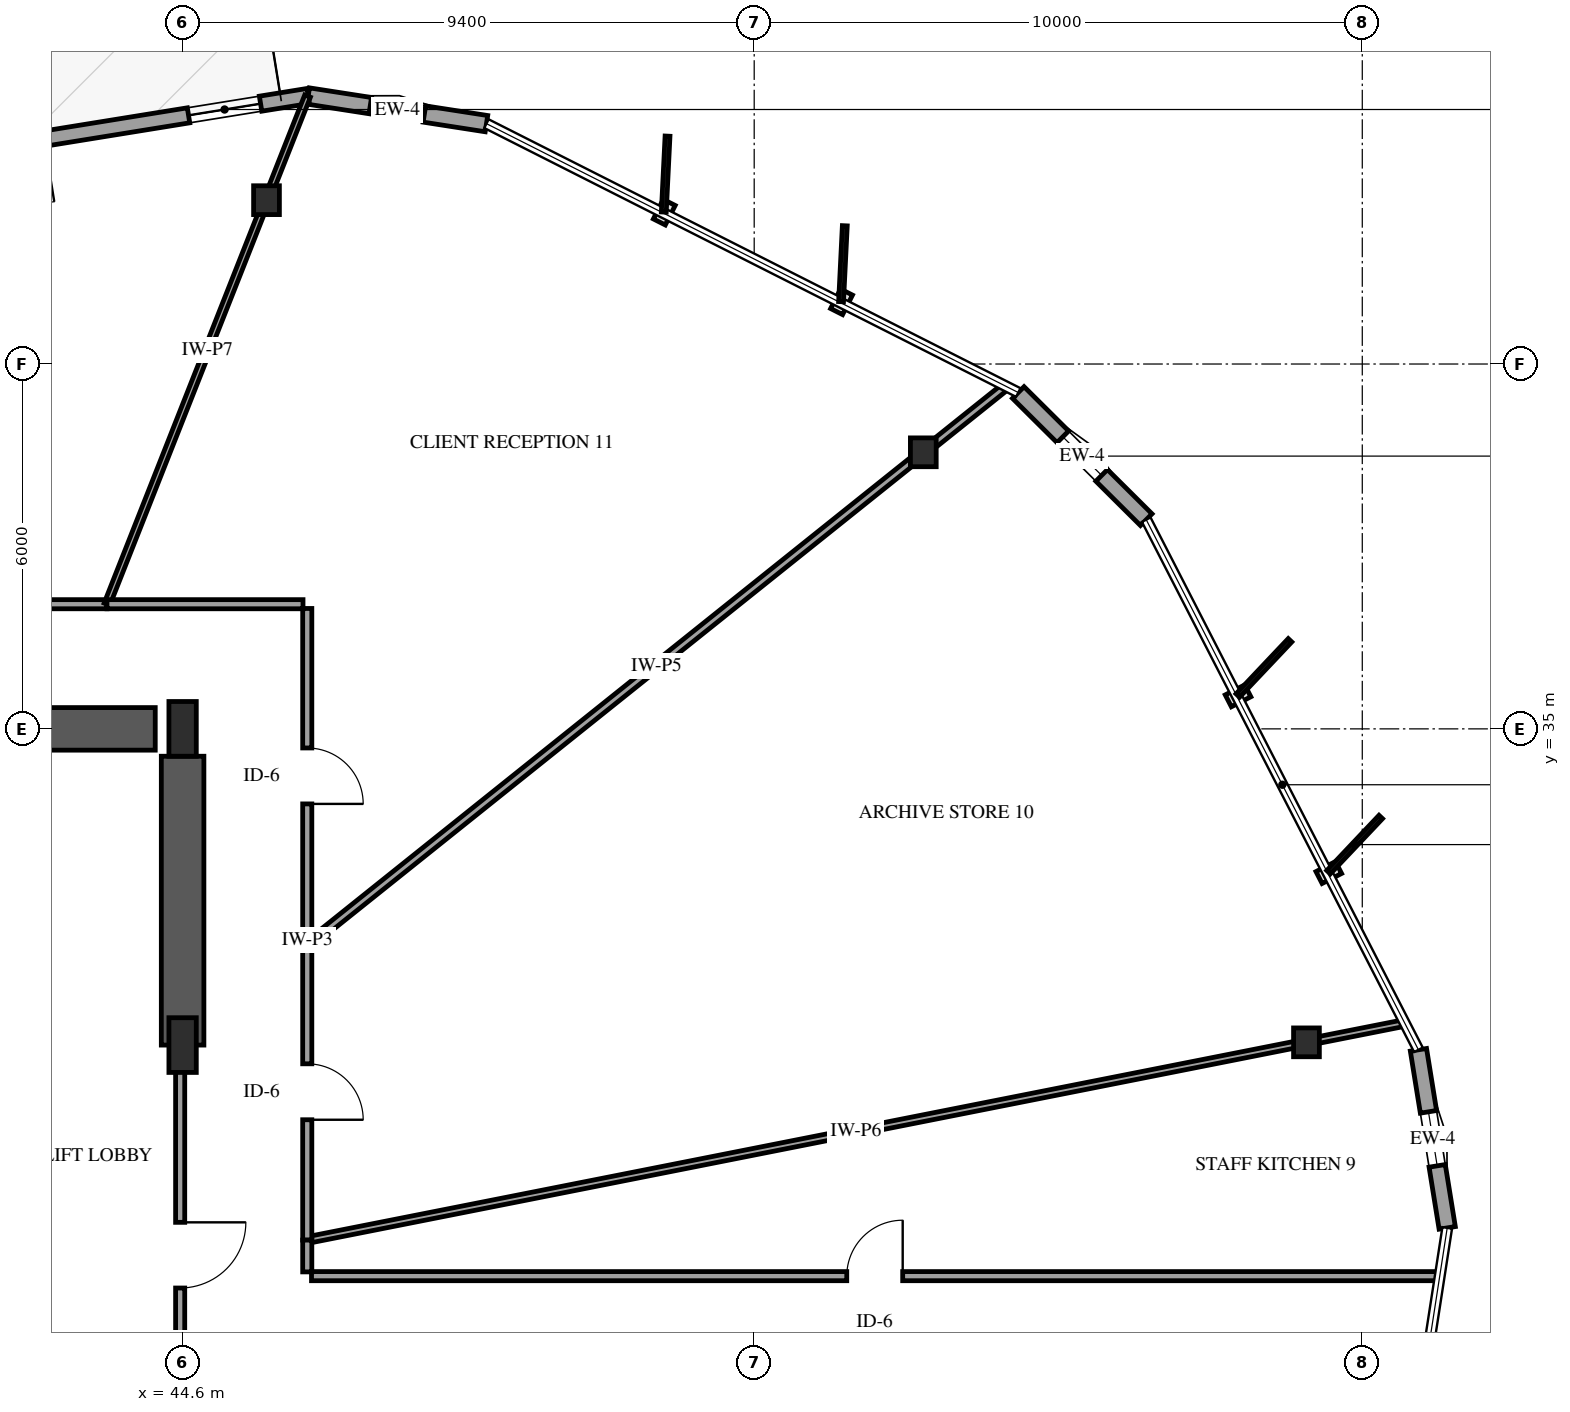
"""IFC4 building model, lengths in metres.
Left out: names, types, materials, properties, quantities, classifications, styles, units other than length and angle.
Written with IfcOpenShell. Run it as: python <this file> out.ifc"""

import sys

from ifc_helpers import new_model, si_unit, direction, frame, frame_2d, origin, origin_2d, place, context, subcontext, project, spatial, rectangle, i_section, extrude, element, fill, save


model = new_model("IFC4")
c1 = context("Model", 3, precision=1e-05, world=origin(), true_north=direction((0.0, 1.0)))
c2 = subcontext(c1, "Body", "Model", "MODEL_VIEW")
j1 = project(units=[si_unit("LENGTHUNIT", "METRE"), si_unit("PLANEANGLEUNIT", "RADIAN")], contexts=[c1])
p1 = place(None, origin())
s1 = spatial("IfcSite", under=j1, at=p1, CompositionType="ELEMENT")
p2 = place(p1, origin())
s2 = spatial("IfcBuilding", under=s1, at=p2, CompositionType="ELEMENT")
p3 = place(p2, frame((0.0, 0.0, 62.6)))
s3 = spatial("IfcBuildingStorey", under=s2, at=p3, CompositionType="ELEMENT", Elevation=62.6)
p4 = place(p3, frame((41.3, 35.0, 0.0), z_axis=(0.0, 0.0, 1.0), x_axis=(1.0, 0.0, 0.0)))
e1 = element("IfcWall", 1, at=p4, inside=s3, PredefinedType="SHEAR", context=c2, shape_type="SweptSolid", body=[
    extrude(rectangle(XDim=2.85, YDim=0.7, at=frame_2d((1.425, 0.0))), origin(), (0.0, 0.0, 1.0), 4.0),
])
p5 = place(p3, frame((44.6, 29.8, 0.0), z_axis=(0.0, 0.0, 1.0), x_axis=(0.0, 1.0, 0.0)))
e2 = element("IfcWall", 2, at=p5, inside=s3, PredefinedType="SHEAR", context=c2, shape_type="SweptSolid", body=[
    extrude(rectangle(XDim=4.75, YDim=0.7, at=frame_2d((2.375, 0.0))), origin(), (0.0, 0.0, 1.0), 4.0),
])
for number, where, z_axis, x_axis in (
    (3, (44.6, 29.8, 0.0), (0.0, 0.0, 1.0), (1.0, 0.0, 0.0)),
    (4, (44.6, 35.0, 0.0), (0.0, 0.0, 1.0), (1.0, 0.0, 0.0)),
):
    element("IfcColumn", number, at=place(p3, frame(where, z_axis=z_axis, x_axis=x_axis)), inside=s3, PredefinedType="PILASTER", context=c2, shape_type="SweptSolid", body=[
        extrude(rectangle(XDim=0.45, YDim=0.9, at=origin_2d()), origin(), (0.0, 0.0, 1.0), 4.0),
    ])
for number, where, z_axis, x_axis in (
    (5, (63.082, 29.845, 0.0), (0.0, 0.0, 1.0), (1.0, 0.0, 0.0)),
    (6, (56.781, 39.548, 0.0), (0.0, 0.0, 1.0), (1.0, 0.0, 0.0)),
    (7, (45.98, 43.694, 0.0), (0.0, 0.0, 1.0), (1.0, 0.0, 0.0)),
):
    element("IfcColumn", number, at=place(p3, frame(where, z_axis=z_axis, x_axis=x_axis)), inside=s3, PredefinedType="COLUMN", context=c2, shape_type="SweptSolid", body=[
        extrude(i_section(OverallWidth=0.424, OverallDepth=0.474, WebThickness=0.048, FlangeThickness=0.077, FilletRadius=0.038, at=origin_2d()), origin(), (0.0, 0.0, 1.0), 4.0),
    ])
p6 = place(p3, frame((60.447, 38.44, 0.0), z_axis=(0.0, 0.0, 1.0), x_axis=(-0.709325332319, 0.704881247396, 0.0)))
e8 = element("IfcWall", 8, at=p6, inside=s3, PredefinedType="SOLIDWALL", context=c2, shape_type="SweptSolid", body=[
    extrude(rectangle(XDim=2.967, YDim=0.27, at=frame_2d((1.483, 0.0))), origin(), (0.0, 0.0, 1.0), 3.079),
])
p7 = place(p6, frame((1.033, 0.0, 0.75)))
e9 = element("IfcOpeningElement", 9, at=p7, cuts=e8, PredefinedType="OPENING", context=c2, shape_type="SweptSolid", body=[
    extrude(rectangle(XDim=0.9, YDim=1.5, at=frame_2d((0.45, 0.75))), frame((0.0, 0.145, 0.0), z_axis=(0.0, -1.0, 0.0), x_axis=(1.0, 0.0, 0.0)), (0.0, 0.0, 1.0), 0.29),
])
p8 = place(p3, frame((49.597, 44.953, 0.0), z_axis=(0.0, 0.0, 1.0), x_axis=(-0.988175838345, 0.153324859402, 0.0)))
e10 = element("IfcWall", 10, at=p8, inside=s3, PredefinedType="SOLIDWALL", context=c2, shape_type="SweptSolid", body=[
    extrude(rectangle(XDim=2.967, YDim=0.27, at=frame_2d((1.483, 0.0))), origin(), (0.0, 0.0, 1.0), 3.079),
])
p9 = place(p8, frame((1.033, 0.0, 0.75)))
e11 = element("IfcOpeningElement", 11, at=p9, cuts=e10, PredefinedType="OPENING", context=c2, shape_type="SweptSolid", body=[
    extrude(rectangle(XDim=0.9, YDim=1.5, at=frame_2d((0.45, 0.75))), frame((0.0, 0.145, 0.0), z_axis=(0.0, -1.0, 0.0), x_axis=(1.0, 0.0, 0.0)), (0.0, 0.0, 1.0), 0.29),
])
p10 = place(p3, frame((46.666, 45.408, 0.0), z_axis=(0.0, 0.0, 1.0), x_axis=(-0.987191297579, -0.159541035424, 0.0)))
e12 = element("IfcWall", 12, at=p10, inside=s3, PredefinedType="SOLIDWALL", context=c2, shape_type="SweptSolid", body=[
    extrude(rectangle(XDim=9.8, YDim=0.25, at=frame_2d((4.9, 0.0))), origin(), (0.0, 0.0, 1.0), 3.079),
])
p11 = place(p10, frame((4.4, 0.0, 0.0)))
e13 = element("IfcOpeningElement", 13, at=p11, cuts=e12, PredefinedType="OPENING", context=c2, shape_type="SweptSolid", body=[
    extrude(rectangle(XDim=1.05, YDim=2.15, at=frame_2d((0.525, 1.075))), frame((0.0, 0.135, 0.0), z_axis=(0.0, -1.0, 0.0), x_axis=(1.0, 0.0, 0.0)), (0.0, 0.0, 1.0), 0.27),
])
p12 = place(p10, frame((0.793, 0.0, 0.72)))
e14 = element("IfcOpeningElement", 14, at=p12, cuts=e12, PredefinedType="OPENING", context=c2, shape_type="SweptSolid", body=[
    extrude(rectangle(XDim=1.2, YDim=1.6, at=frame_2d((0.6, 0.8))), frame((0.0, 0.135, 0.0), z_axis=(0.0, -1.0, 0.0), x_axis=(1.0, 0.0, 0.0)), (0.0, 0.0, 1.0), 0.27),
])
p13 = place(p10, frame((6.09, 0.0, 0.72)))
e15 = element("IfcOpeningElement", 15, at=p13, cuts=e12, PredefinedType="OPENING", context=c2, shape_type="SweptSolid", body=[
    extrude(rectangle(XDim=1.2, YDim=1.6, at=frame_2d((0.6, 0.8))), frame((0.0, 0.135, 0.0), z_axis=(0.0, -1.0, 0.0), x_axis=(1.0, 0.0, 0.0)), (0.0, 0.0, 1.0), 0.27),
])
p14 = place(p3, frame((65.397, 26.794, 0.0), z_axis=(0.0, 0.0, 1.0), x_axis=(-0.159485992922, 0.987200191482, 0.0)))
e16 = element("IfcWall", 16, at=p14, inside=s3, PredefinedType="SOLIDWALL", context=c2, shape_type="SweptSolid", body=[
    extrude(rectangle(XDim=2.967, YDim=0.27, at=frame_2d((1.483, 0.0))), origin(), (0.0, 0.0, 1.0), 3.079),
])
p15 = place(p14, frame((1.033, 0.0, 0.75)))
e17 = element("IfcOpeningElement", 17, at=p15, cuts=e16, PredefinedType="OPENING", context=c2, shape_type="SweptSolid", body=[
    extrude(rectangle(XDim=0.9, YDim=1.5, at=frame_2d((0.45, 0.75))), frame((0.0, 0.145, 0.0), z_axis=(0.0, -1.0, 0.0), x_axis=(1.0, 0.0, 0.0)), (0.0, 0.0, 1.0), 0.29),
])
p16 = place(p3, frame((46.72, 26.0, 0.0), z_axis=(0.0, 0.0, 1.0), x_axis=(1.0, 0.0, 0.0)))
e18 = element("IfcWall", 18, at=p16, inside=s3, PredefinedType="PARTITIONING", context=c2, shape_type="SweptSolid", body=[
    extrude(rectangle(XDim=18.554, YDim=0.15, at=frame_2d((9.277, 0.0))), origin(), (0.0, 0.0, 1.0), 3.7),
])
p17 = place(p16, frame((8.802, 0.0, 0.0)))
e19 = element("IfcOpeningElement", 19, at=p17, cuts=e18, PredefinedType="OPENING", context=c2, shape_type="SweptSolid", body=[
    extrude(rectangle(XDim=0.92, YDim=2.12, at=frame_2d((0.46, 1.06))), frame((0.0, 0.085, 0.0), z_axis=(0.0, -1.0, 0.0), x_axis=(1.0, 0.0, 0.0)), (0.0, 0.0, 1.0), 0.17),
])
p18 = place(p3, frame((46.65, 26.593, 0.0), z_axis=(0.0, 0.0, 1.0), x_axis=(0.980979806003, 0.194109814835, 0.0)))
e20 = element("IfcWall", 20, at=p18, inside=s3, PredefinedType="PARTITIONING", context=c2, shape_type="SweptSolid", body=[
    extrude(rectangle(XDim=18.397, YDim=0.11, at=frame_2d((9.198, 0.0))), origin(), (0.0, 0.0, 1.0), 2.995),
])
p19 = place(p3, frame((46.65, 31.442, 0.0), z_axis=(0.0, 0.0, 1.0), x_axis=(0.780838051211, 0.624733493405, 0.0)))
e21 = element("IfcWall", 21, at=p19, inside=s3, PredefinedType="PARTITIONING", context=c2, shape_type="SweptSolid", body=[
    extrude(rectangle(XDim=14.714, YDim=0.13, at=frame_2d((7.357, 0.0))), origin(), (0.0, 0.0, 1.0), 3.7),
])
p20 = place(p3, frame((32.67, 37.05, 0.0), z_axis=(0.0, 0.0, 1.0), x_axis=(1.0, 0.0, 0.0)))
e22 = element("IfcWall", 22, at=p20, inside=s3, PredefinedType="PARTITIONING", context=c2, shape_type="SweptSolid", body=[
    extrude(rectangle(XDim=10.686, YDim=0.15, at=frame_2d((5.343, 0.0))), origin(), (0.0, 0.0, 1.0), 3.7),
])
p21 = place(p20, frame((4.868, 0.0, 0.0)))
e23 = element("IfcOpeningElement", 23, at=p21, cuts=e22, PredefinedType="OPENING", context=c2, shape_type="SweptSolid", body=[
    extrude(rectangle(XDim=0.92, YDim=2.12, at=frame_2d((0.46, 1.06))), frame((0.0, 0.085, 0.0), z_axis=(0.0, -1.0, 0.0), x_axis=(1.0, 0.0, 0.0)), (0.0, 0.0, 1.0), 0.17),
])
p22 = place(p3, frame((43.356, 37.05, 0.0), z_axis=(0.0, 0.0, 1.0), x_axis=(0.367230883779, 0.930129817821, 0.0)))
e24 = element("IfcWall", 24, at=p22, inside=s3, PredefinedType="PARTITIONING", context=c2, shape_type="SweptSolid", body=[
    extrude(rectangle(XDim=8.984, YDim=0.1, at=frame_2d((4.492, 0.0))), origin(), (0.0, 0.0, 1.0), 2.995),
])
p23 = place(p3, frame((44.56, 29.8, 0.0), z_axis=(0.0, 0.0, 1.0), x_axis=(0.0, -1.0, 0.0)))
e25 = element("IfcWall", 25, at=p23, inside=s3, PredefinedType="PARTITIONING", context=c2, shape_type="SweptSolid", body=[
    extrude(rectangle(XDim=6.91, YDim=0.15, at=frame_2d((3.455, 0.0))), origin(), (0.0, 0.0, 1.0), 2.74),
])
p24 = place(p23, frame((2.915, 0.0, 0.0)))
e26 = element("IfcOpeningElement", 26, at=p24, cuts=e25, PredefinedType="OPENING", context=c2, shape_type="SweptSolid", body=[
    extrude(rectangle(XDim=1.08, YDim=2.15, at=frame_2d((0.54, 1.075))), frame((0.0, 0.085, 0.0), z_axis=(0.0, -1.0, 0.0), x_axis=(1.0, 0.0, 0.0)), (0.0, 0.0, 1.0), 0.17),
])
p25 = place(p3, frame((46.65, 36.98, 0.0), z_axis=(0.0, 0.0, 1.0), x_axis=(0.0, -1.0, 0.0)))
e27 = element("IfcWall", 27, at=p25, inside=s3, PredefinedType="PARTITIONING", context=c2, shape_type="SweptSolid", body=[
    extrude(rectangle(XDim=5.538, YDim=0.15, at=frame_2d((2.769, 0.0))), origin(), (0.0, 0.0, 1.0), 3.7),
])
p26 = place(p25, frame((2.294, 0.0, 0.0)))
e28 = element("IfcOpeningElement", 28, at=p26, cuts=e27, PredefinedType="OPENING", context=c2, shape_type="SweptSolid", body=[
    extrude(rectangle(XDim=0.92, YDim=2.12, at=frame_2d((0.46, 1.06))), frame((0.0, 0.085, 0.0), z_axis=(0.0, -1.0, 0.0), x_axis=(1.0, 0.0, 0.0)), (0.0, 0.0, 1.0), 0.17),
])
p27 = place(p3, frame((46.65, 31.442, 0.0), z_axis=(0.0, 0.0, 1.0), x_axis=(0.0, -1.0, 0.0)))
e29 = element("IfcWall", 29, at=p27, inside=s3, PredefinedType="PARTITIONING", context=c2, shape_type="SweptSolid", body=[
    extrude(rectangle(XDim=4.849, YDim=0.15, at=frame_2d((2.424, 0.0))), origin(), (0.0, 0.0, 1.0), 3.7),
])
p28 = place(p27, frame((1.95, 0.0, 0.0)))
e30 = element("IfcOpeningElement", 30, at=p28, cuts=e29, PredefinedType="OPENING", context=c2, shape_type="SweptSolid", body=[
    extrude(rectangle(XDim=0.92, YDim=2.12, at=frame_2d((0.46, 1.06))), frame((0.0, 0.085, 0.0), z_axis=(0.0, -1.0, 0.0), x_axis=(1.0, 0.0, 0.0)), (0.0, 0.0, 1.0), 0.17),
])
p29 = place(p3, frame((43.356, 37.05, 0.0), z_axis=(0.0, 0.0, 1.0), x_axis=(1.0, 0.0, 0.0)))
e31 = element("IfcWall", 31, at=p29, inside=s3, PredefinedType="PARTITIONING", context=c2, shape_type="SweptSolid", body=[
    extrude(rectangle(XDim=3.224, YDim=0.15, at=frame_2d((1.612, 0.0))), origin(), (0.0, 0.0, 1.0), 3.7),
])
p30 = place(p3, frame((46.65, 26.593, 0.0), z_axis=(0.0, 0.0, 1.0), x_axis=(0.0, -1.0, 0.0)))
e32 = element("IfcWall", 32, at=p30, inside=s3, PredefinedType="PARTITIONING", context=c2, shape_type="SweptSolid", body=[
    extrude(rectangle(XDim=0.523, YDim=0.15, at=frame_2d((0.261, 0.0))), origin(), (0.0, 0.0, 1.0), 3.7),
])
p31 = place(p7, origin())
e33 = element("IfcWindow", 33, at=p31, inside=s3, PartitioningType="SINGLE_PANEL", PredefinedType="WINDOW", context=c2, shape_type="SweptSolid", body=[
    extrude(rectangle(XDim=0.9, YDim=1.5, at=frame_2d((0.45, 0.75))), frame((0.0, 0.03, 0.0), z_axis=(0.0, -1.0, 0.0), x_axis=(1.0, 0.0, 0.0)), (0.0, 0.0, 1.0), 0.06),
])
fill(e9, e33)
p32 = place(p9, origin())
e34 = element("IfcWindow", 34, at=p32, inside=s3, PartitioningType="SINGLE_PANEL", PredefinedType="WINDOW", context=c2, shape_type="SweptSolid", body=[
    extrude(rectangle(XDim=0.9, YDim=1.5, at=frame_2d((0.45, 0.75))), frame((0.0, 0.03, 0.0), z_axis=(0.0, -1.0, 0.0), x_axis=(1.0, 0.0, 0.0)), (0.0, 0.0, 1.0), 0.06),
])
fill(e11, e34)
p33 = place(p12, origin())
e35 = element("IfcWindow", 35, at=p33, inside=s3, PartitioningType="SINGLE_PANEL", PredefinedType="WINDOW", context=c2, shape_type="SweptSolid", body=[
    extrude(rectangle(XDim=1.2, YDim=1.6, at=frame_2d((0.6, 0.8))), frame((0.0, 0.03, 0.0), z_axis=(0.0, -1.0, 0.0), x_axis=(1.0, 0.0, 0.0)), (0.0, 0.0, 1.0), 0.06),
])
fill(e14, e35)
p34 = place(p15, origin())
e36 = element("IfcWindow", 36, at=p34, inside=s3, PartitioningType="SINGLE_PANEL", PredefinedType="WINDOW", context=c2, shape_type="SweptSolid", body=[
    extrude(rectangle(XDim=0.9, YDim=1.5, at=frame_2d((0.45, 0.75))), frame((0.0, 0.03, 0.0), z_axis=(0.0, -1.0, 0.0), x_axis=(1.0, 0.0, 0.0)), (0.0, 0.0, 1.0), 0.06),
])
fill(e17, e36)
p35 = place(p17, origin())
e37 = element("IfcDoor", 37, at=p35, inside=s3, OperationType="SINGLE_SWING_RIGHT", PredefinedType="DOOR", context=c2, shape_type="SweptSolid", body=[
    extrude(rectangle(XDim=0.92, YDim=2.12, at=frame_2d((0.46, 1.06))), frame((0.0, 0.025, 0.0), z_axis=(0.0, -1.0, 0.0), x_axis=(1.0, 0.0, 0.0)), (0.0, 0.0, 1.0), 0.05),
])
fill(e19, e37)
p36 = place(p24, origin())
e38 = element("IfcDoor", 38, at=p36, inside=s3, OperationType="SINGLE_SWING_LEFT", PredefinedType="DOOR", context=c2, shape_type="SweptSolid", body=[
    extrude(rectangle(XDim=1.08, YDim=2.15, at=frame_2d((0.54, 1.075))), frame((0.0, 0.025, 0.0), z_axis=(0.0, -1.0, 0.0), x_axis=(1.0, 0.0, 0.0)), (0.0, 0.0, 1.0), 0.05),
])
fill(e26, e38)
p37 = place(p26, origin())
e39 = element("IfcDoor", 39, at=p37, inside=s3, OperationType="SINGLE_SWING_RIGHT", PredefinedType="DOOR", context=c2, shape_type="SweptSolid", body=[
    extrude(rectangle(XDim=0.92, YDim=2.12, at=frame_2d((0.46, 1.06))), frame((0.0, 0.025, 0.0), z_axis=(0.0, -1.0, 0.0), x_axis=(1.0, 0.0, 0.0)), (0.0, 0.0, 1.0), 0.05),
])
fill(e28, e39)
p38 = place(p28, origin())
e40 = element("IfcDoor", 40, at=p38, inside=s3, OperationType="SINGLE_SWING_RIGHT", PredefinedType="DOOR", context=c2, shape_type="SweptSolid", body=[
    extrude(rectangle(XDim=0.92, YDim=2.12, at=frame_2d((0.46, 1.06))), frame((0.0, 0.025, 0.0), z_axis=(0.0, -1.0, 0.0), x_axis=(1.0, 0.0, 0.0)), (0.0, 0.0, 1.0), 0.05),
])
fill(e30, e40)
save(model, sys.argv[1])
